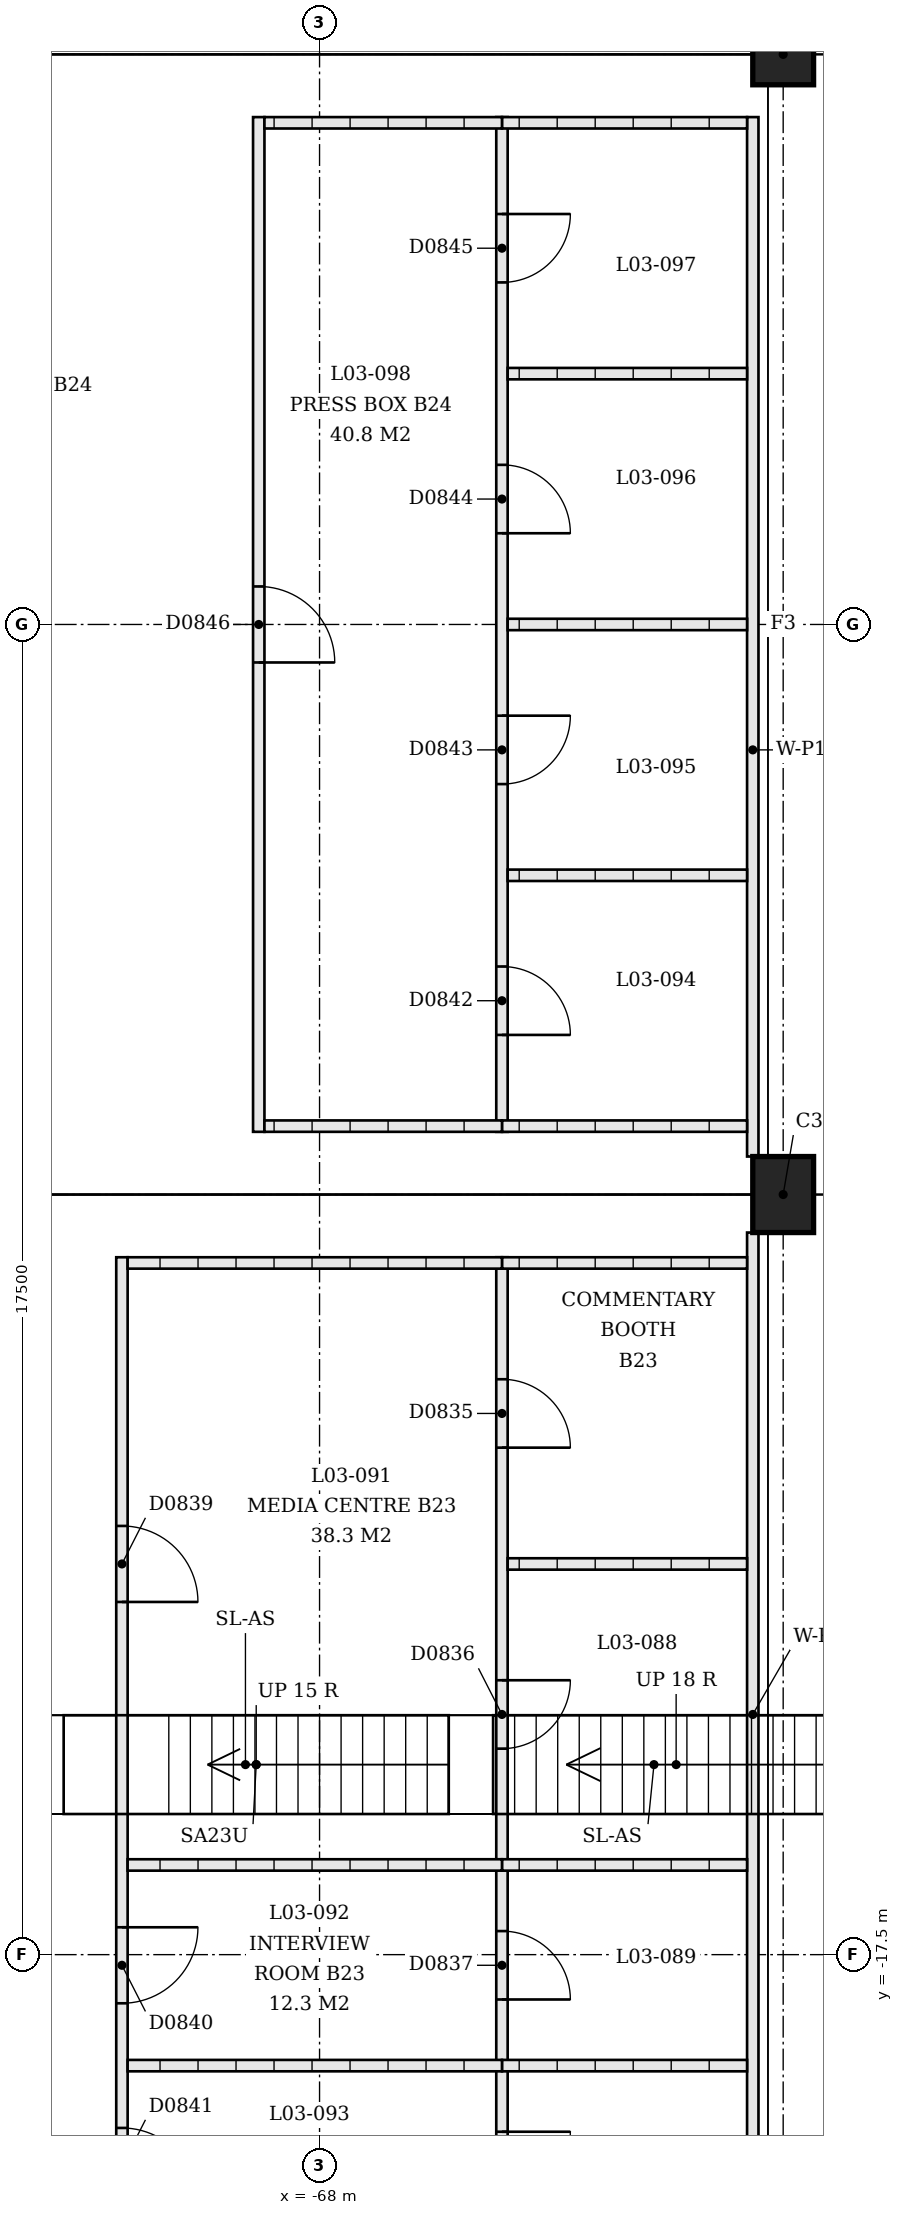
"""IFC4 building model, lengths in metres.
Left out: names, types, materials, properties, quantities, classifications, styles, units other than length and angle.
Written with IfcOpenShell. Run it as: python <this file> out.ifc"""

import sys

from ifc_helpers import new_model, si_unit, direction, frame, frame_2d, origin, origin_2d, place, context, subcontext, project, spatial, rectangle, extrude, element, fill, save


model = new_model("IFC4")
c1 = context("Model", 3, precision=1e-05, world=origin(), true_north=direction((0.0, 1.0)))
c2 = subcontext(c1, "Body", "Model", "MODEL_VIEW")
j1 = project(units=[si_unit("LENGTHUNIT", "METRE"), si_unit("PLANEANGLEUNIT", "RADIAN")], contexts=[c1])
p1 = place(None, origin())
s1 = spatial("IfcSite", under=j1, at=p1, CompositionType="ELEMENT")
p2 = place(p1, origin())
s2 = spatial("IfcBuilding", under=s1, at=p2, CompositionType="ELEMENT")
p3 = place(p2, frame((0.0, 0.0, 13.5)))
s3 = spatial("IfcBuildingStorey", under=s2, at=p3, CompositionType="ELEMENT", Elevation=13.5)
p4 = place(p3, frame((-61.9, -7.5, 0.0), z_axis=(0.0, 0.0, 1.0), x_axis=(0.0, -1.0, 0.0)))
e1 = element("IfcColumn", 1, at=p4, inside=s3, PredefinedType="COLUMN", context=c2, shape_type="SweptSolid", body=[
    extrude(rectangle(XDim=1.0, YDim=0.8, at=origin_2d()), origin(), (0.0, 0.0, 1.0), 2.033),
])
p5 = place(p3, frame((-61.9, 7.5, 0.0), z_axis=(0.0, 0.0, 1.0), x_axis=(0.0, -1.0, 0.0)))
e2 = element("IfcColumn", 2, at=p5, inside=s3, PredefinedType="COLUMN", context=c2, shape_type="SweptSolid", body=[
    extrude(rectangle(XDim=0.8, YDim=0.8, at=origin_2d()), origin(), (0.0, 0.0, 1.0), 2.033),
])
p6 = place(p3, frame((-62.3, -8.0, 0.0), z_axis=(0.0, 0.0, 1.0), x_axis=(0.0, -1.0, 0.0)))
e3 = element("IfcWall", 3, at=p6, inside=s3, PredefinedType="PARTITIONING", context=c2, shape_type="SweptSolid", body=[
    extrude(rectangle(XDim=13.675, YDim=0.15, at=frame_2d((6.837, 0.0))), origin(), (0.0, 0.0, 1.0), 3.0),
])
p7 = place(p3, frame((-65.6, -8.325, 0.0), z_axis=(0.0, 0.0, 1.0), x_axis=(0.0, -1.0, 0.0)))
e4 = element("IfcWall", 4, at=p7, inside=s3, PredefinedType="PARTITIONING", context=c2, shape_type="SweptSolid", body=[
    extrude(rectangle(XDim=13.35, YDim=0.15, at=frame_2d((6.675, 0.0))), origin(), (0.0, 0.0, 1.0), 3.0),
])
p8 = place(p7, frame((1.605, 0.0, 0.0)))
e5 = element("IfcOpeningElement", 5, at=p8, cuts=e4, PredefinedType="OPENING", context=c2, shape_type="SweptSolid", body=[
    extrude(rectangle(XDim=0.9, YDim=2.1, at=frame_2d((0.45, 1.05))), frame((0.0, 0.075, 0.0), z_axis=(0.0, -1.0, 0.0), x_axis=(1.0, 0.0, 0.0)), (0.0, 0.0, 1.0), 0.15),
])
p9 = place(p7, frame((5.565, 0.0, 0.0)))
e6 = element("IfcOpeningElement", 6, at=p9, cuts=e4, PredefinedType="OPENING", context=c2, shape_type="SweptSolid", body=[
    extrude(rectangle(XDim=0.9, YDim=2.1, at=frame_2d((0.45, 1.05))), frame((0.0, 0.075, 0.0), z_axis=(0.0, -1.0, 0.0), x_axis=(1.0, 0.0, 0.0)), (0.0, 0.0, 1.0), 0.15),
])
p10 = place(p7, frame((8.865, 0.0, 0.0)))
e7 = element("IfcOpeningElement", 7, at=p10, cuts=e4, PredefinedType="OPENING", context=c2, shape_type="SweptSolid", body=[
    extrude(rectangle(XDim=0.9, YDim=2.1, at=frame_2d((0.45, 1.05))), frame((0.0, 0.075, 0.0), z_axis=(0.0, -1.0, 0.0), x_axis=(1.0, 0.0, 0.0)), (0.0, 0.0, 1.0), 0.15),
])
p11 = place(p7, frame((11.505, 0.0, 0.0)))
e8 = element("IfcOpeningElement", 8, at=p11, cuts=e4, PredefinedType="OPENING", context=c2, shape_type="SweptSolid", body=[
    extrude(rectangle(XDim=0.9, YDim=2.1, at=frame_2d((0.45, 1.05))), frame((0.0, 0.075, 0.0), z_axis=(0.0, -1.0, 0.0), x_axis=(1.0, 0.0, 0.0)), (0.0, 0.0, 1.0), 0.15),
])
p12 = place(p3, frame((-62.375, -8.4, 0.0), z_axis=(0.0, 0.0, 1.0), x_axis=(-1.0, 0.0, 0.0)))
e9 = element("IfcWall", 9, at=p12, inside=s3, PredefinedType="PARTITIONING", context=c2, shape_type="SweptSolid", body=[
    extrude(rectangle(XDim=3.225, YDim=0.15, at=frame_2d((1.613, 0.0))), origin(), (0.0, 0.0, 1.0), 3.0),
])
p13 = place(p3, frame((-62.375, -12.36, 0.0), z_axis=(0.0, 0.0, 1.0), x_axis=(-1.0, 0.0, 0.0)))
e10 = element("IfcWall", 10, at=p13, inside=s3, PredefinedType="PARTITIONING", context=c2, shape_type="SweptSolid", body=[
    extrude(rectangle(XDim=3.15, YDim=0.15, at=frame_2d((1.575, 0.0))), origin(), (0.0, 0.0, 1.0), 3.0),
])
for number, where, z_axis, x_axis in (
    (11, (-62.375, -16.32, 0.0), (0.0, 0.0, 1.0), (-1.0, 0.0, 0.0)),
    (12, (-62.375, -18.96, 0.0), (0.0, 0.0, 1.0), (-1.0, 0.0, 0.0)),
):
    element("IfcWall", number, at=place(p3, frame(where, z_axis=z_axis, x_axis=x_axis)), inside=s3, PredefinedType="PARTITIONING", context=c2, shape_type="SweptSolid", body=[
        extrude(rectangle(XDim=3.225, YDim=0.15, at=frame_2d((1.613, 0.0))), origin(), (0.0, 0.0, 1.0), 3.0),
    ])
p14 = place(p3, frame((-70.6, -8.325, 0.0), z_axis=(0.0, 0.0, 1.0), x_axis=(0.0, -1.0, 0.0)))
e13 = element("IfcWall", 13, at=p14, inside=s3, PredefinedType="PARTITIONING", context=c2, shape_type="SweptSolid", body=[
    extrude(rectangle(XDim=13.35, YDim=0.15, at=frame_2d((6.675, 0.0))), origin(), (0.0, 0.0, 1.0), 3.0),
])
p15 = place(p14, frame((3.535, 0.0, 0.0)))
e14 = element("IfcOpeningElement", 14, at=p15, cuts=e13, PredefinedType="OPENING", context=c2, shape_type="SweptSolid", body=[
    extrude(rectangle(XDim=1.0, YDim=2.1, at=frame_2d((0.5, 1.05))), frame((0.0, 0.075, 0.0), z_axis=(0.0, -1.0, 0.0), x_axis=(1.0, 0.0, 0.0)), (0.0, 0.0, 1.0), 0.15),
])
p16 = place(p14, frame((8.815, 0.0, 0.0)))
e15 = element("IfcOpeningElement", 15, at=p16, cuts=e13, PredefinedType="OPENING", context=c2, shape_type="SweptSolid", body=[
    extrude(rectangle(XDim=1.0, YDim=2.1, at=frame_2d((0.5, 1.05))), frame((0.0, 0.075, 0.0), z_axis=(0.0, -1.0, 0.0), x_axis=(1.0, 0.0, 0.0)), (0.0, 0.0, 1.0), 0.15),
])
p17 = place(p14, frame((11.455, 0.0, 0.0)))
e16 = element("IfcOpeningElement", 16, at=p17, cuts=e13, PredefinedType="OPENING", context=c2, shape_type="SweptSolid", body=[
    extrude(rectangle(XDim=1.0, YDim=2.1, at=frame_2d((0.5, 1.05))), frame((0.0, 0.075, 0.0), z_axis=(0.0, -1.0, 0.0), x_axis=(1.0, 0.0, 0.0)), (0.0, 0.0, 1.0), 0.15),
])
for number, where, z_axis, x_axis in (
    (17, (-65.6, -8.4, 0.0), (0.0, 0.0, 1.0), (-1.0, 0.0, 0.0)),
    (18, (-65.6, -16.32, 0.0), (0.0, 0.0, 1.0), (-1.0, 0.0, 0.0)),
    (19, (-65.6, -18.96, 0.0), (0.0, 0.0, 1.0), (-1.0, 0.0, 0.0)),
):
    element("IfcWall", number, at=place(p3, frame(where, z_axis=z_axis, x_axis=x_axis)), inside=s3, PredefinedType="PARTITIONING", context=c2, shape_type="SweptSolid", body=[
        extrude(rectangle(XDim=4.925, YDim=0.15, at=frame_2d((2.462, 0.0))), origin(), (0.0, 0.0, 1.0), 3.0),
    ])
p18 = place(p3, frame((-62.3, -7.0, 0.0), z_axis=(0.0, 0.0, 1.0), x_axis=(0.0, 1.0, 0.0)))
e20 = element("IfcWall", 20, at=p18, inside=s3, PredefinedType="PARTITIONING", context=c2, shape_type="SweptSolid", body=[
    extrude(rectangle(XDim=13.675, YDim=0.15, at=frame_2d((6.837, 0.0))), origin(), (0.0, 0.0, 1.0), 3.0),
])
p19 = place(p3, frame((-65.6, -6.675, 0.0), z_axis=(0.0, 0.0, 1.0), x_axis=(0.0, 1.0, 0.0)))
e21 = element("IfcWall", 21, at=p19, inside=s3, PredefinedType="PARTITIONING", context=c2, shape_type="SweptSolid", body=[
    extrude(rectangle(XDim=13.35, YDim=0.15, at=frame_2d((6.675, 0.0))), origin(), (0.0, 0.0, 1.0), 3.0),
])
p20 = place(p19, frame((1.275, 0.0, 0.0)))
e22 = element("IfcOpeningElement", 22, at=p20, cuts=e21, PredefinedType="OPENING", context=c2, shape_type="SweptSolid", body=[
    extrude(rectangle(XDim=0.9, YDim=2.1, at=frame_2d((0.45, 1.05))), frame((0.0, 0.075, 0.0), z_axis=(0.0, -1.0, 0.0), x_axis=(1.0, 0.0, 0.0)), (0.0, 0.0, 1.0), 0.15),
])
p21 = place(p19, frame((4.575, 0.0, 0.0)))
e23 = element("IfcOpeningElement", 23, at=p21, cuts=e21, PredefinedType="OPENING", context=c2, shape_type="SweptSolid", body=[
    extrude(rectangle(XDim=0.9, YDim=2.1, at=frame_2d((0.45, 1.05))), frame((0.0, 0.075, 0.0), z_axis=(0.0, -1.0, 0.0), x_axis=(1.0, 0.0, 0.0)), (0.0, 0.0, 1.0), 0.15),
])
p22 = place(p19, frame((7.875, 0.0, 0.0)))
e24 = element("IfcOpeningElement", 24, at=p22, cuts=e21, PredefinedType="OPENING", context=c2, shape_type="SweptSolid", body=[
    extrude(rectangle(XDim=0.9, YDim=2.1, at=frame_2d((0.45, 1.05))), frame((0.0, 0.075, 0.0), z_axis=(0.0, -1.0, 0.0), x_axis=(1.0, 0.0, 0.0)), (0.0, 0.0, 1.0), 0.15),
])
p23 = place(p19, frame((11.175, 0.0, 0.0)))
e25 = element("IfcOpeningElement", 25, at=p23, cuts=e21, PredefinedType="OPENING", context=c2, shape_type="SweptSolid", body=[
    extrude(rectangle(XDim=0.9, YDim=2.1, at=frame_2d((0.45, 1.05))), frame((0.0, 0.075, 0.0), z_axis=(0.0, -1.0, 0.0), x_axis=(1.0, 0.0, 0.0)), (0.0, 0.0, 1.0), 0.15),
])
p24 = place(p3, frame((-62.375, -6.6, 0.0), z_axis=(0.0, 0.0, 1.0), x_axis=(-1.0, 0.0, 0.0)))
e26 = element("IfcWall", 26, at=p24, inside=s3, PredefinedType="PARTITIONING", context=c2, shape_type="SweptSolid", body=[
    extrude(rectangle(XDim=3.225, YDim=0.15, at=frame_2d((1.613, 0.0))), origin(), (0.0, 0.0, 1.0), 3.0),
])
for number, where, z_axis, x_axis in (
    (27, (-62.375, -3.3, 0.0), (0.0, 0.0, 1.0), (-1.0, 0.0, 0.0)),
    (28, (-62.375, 0.0, 0.0), (0.0, 0.0, 1.0), (-1.0, 0.0, 0.0)),
    (29, (-62.375, 3.3, 0.0), (0.0, 0.0, 1.0), (-1.0, 0.0, 0.0)),
):
    element("IfcWall", number, at=place(p3, frame(where, z_axis=z_axis, x_axis=x_axis)), inside=s3, PredefinedType="PARTITIONING", context=c2, shape_type="SweptSolid", body=[
        extrude(rectangle(XDim=3.15, YDim=0.15, at=frame_2d((1.575, 0.0))), origin(), (0.0, 0.0, 1.0), 3.0),
    ])
p25 = place(p3, frame((-62.375, 6.6, 0.0), z_axis=(0.0, 0.0, 1.0), x_axis=(-1.0, 0.0, 0.0)))
e30 = element("IfcWall", 30, at=p25, inside=s3, PredefinedType="PARTITIONING", context=c2, shape_type="SweptSolid", body=[
    extrude(rectangle(XDim=3.225, YDim=0.15, at=frame_2d((1.613, 0.0))), origin(), (0.0, 0.0, 1.0), 3.0),
])
p26 = place(p3, frame((-68.8, -6.675, 0.0), z_axis=(0.0, 0.0, 1.0), x_axis=(0.0, 1.0, 0.0)))
e31 = element("IfcWall", 31, at=p26, inside=s3, PredefinedType="PARTITIONING", context=c2, shape_type="SweptSolid", body=[
    extrude(rectangle(XDim=13.35, YDim=0.15, at=frame_2d((6.675, 0.0))), origin(), (0.0, 0.0, 1.0), 3.0),
])
p27 = place(p26, frame((6.175, 0.0, 0.0)))
e32 = element("IfcOpeningElement", 32, at=p27, cuts=e31, PredefinedType="OPENING", context=c2, shape_type="SweptSolid", body=[
    extrude(rectangle(XDim=1.0, YDim=2.1, at=frame_2d((0.5, 1.05))), frame((0.0, 0.075, 0.0), z_axis=(0.0, -1.0, 0.0), x_axis=(1.0, 0.0, 0.0)), (0.0, 0.0, 1.0), 0.15),
])
for number, where, z_axis, x_axis in (
    (33, (-65.6, -6.6, 0.0), (0.0, 0.0, 1.0), (-1.0, 0.0, 0.0)),
    (34, (-65.6, 6.6, 0.0), (0.0, 0.0, 1.0), (-1.0, 0.0, 0.0)),
):
    element("IfcWall", number, at=place(p3, frame(where, z_axis=z_axis, x_axis=x_axis)), inside=s3, PredefinedType="PARTITIONING", context=c2, shape_type="SweptSolid", body=[
        extrude(rectangle(XDim=3.125, YDim=0.15, at=frame_2d((1.562, 0.0))), origin(), (0.0, 0.0, 1.0), 3.0),
    ])
p28 = place(p8, origin())
e35 = element("IfcDoor", 35, at=p28, inside=s3, OperationType="SINGLE_SWING_LEFT", PredefinedType="DOOR", context=c2, shape_type="SweptSolid", body=[
    extrude(rectangle(XDim=0.9, YDim=2.1, at=frame_2d((0.45, 1.05))), frame((0.0, 0.025, 0.0), z_axis=(0.0, -1.0, 0.0), x_axis=(1.0, 0.0, 0.0)), (0.0, 0.0, 1.0), 0.05),
])
fill(e5, e35)
p29 = place(p9, origin())
e36 = element("IfcDoor", 36, at=p29, inside=s3, OperationType="SINGLE_SWING_RIGHT", PredefinedType="DOOR", context=c2, shape_type="SweptSolid", body=[
    extrude(rectangle(XDim=0.9, YDim=2.1, at=frame_2d((0.45, 1.05))), frame((0.0, 0.025, 0.0), z_axis=(0.0, -1.0, 0.0), x_axis=(1.0, 0.0, 0.0)), (0.0, 0.0, 1.0), 0.05),
])
fill(e6, e36)
p30 = place(p10, origin())
e37 = element("IfcDoor", 37, at=p30, inside=s3, OperationType="SINGLE_SWING_LEFT", PredefinedType="DOOR", context=c2, shape_type="SweptSolid", body=[
    extrude(rectangle(XDim=0.9, YDim=2.1, at=frame_2d((0.45, 1.05))), frame((0.0, 0.025, 0.0), z_axis=(0.0, -1.0, 0.0), x_axis=(1.0, 0.0, 0.0)), (0.0, 0.0, 1.0), 0.05),
])
fill(e7, e37)
p31 = place(p11, origin())
e38 = element("IfcDoor", 38, at=p31, inside=s3, OperationType="SINGLE_SWING_RIGHT", PredefinedType="DOOR", context=c2, shape_type="SweptSolid", body=[
    extrude(rectangle(XDim=0.9, YDim=2.1, at=frame_2d((0.45, 1.05))), frame((0.0, 0.025, 0.0), z_axis=(0.0, -1.0, 0.0), x_axis=(1.0, 0.0, 0.0)), (0.0, 0.0, 1.0), 0.05),
])
fill(e8, e38)
p32 = place(p15, origin())
e39 = element("IfcDoor", 39, at=p32, inside=s3, OperationType="SINGLE_SWING_LEFT", PredefinedType="DOOR", context=c2, shape_type="SweptSolid", body=[
    extrude(rectangle(XDim=1.0, YDim=2.1, at=frame_2d((0.5, 1.05))), frame((0.0, 0.025, 0.0), z_axis=(0.0, -1.0, 0.0), x_axis=(1.0, 0.0, 0.0)), (0.0, 0.0, 1.0), 0.05),
])
fill(e14, e39)
p33 = place(p16, origin())
e40 = element("IfcDoor", 40, at=p33, inside=s3, OperationType="SINGLE_SWING_RIGHT", PredefinedType="DOOR", context=c2, shape_type="SweptSolid", body=[
    extrude(rectangle(XDim=1.0, YDim=2.1, at=frame_2d((0.5, 1.05))), frame((0.0, 0.025, 0.0), z_axis=(0.0, -1.0, 0.0), x_axis=(1.0, 0.0, 0.0)), (0.0, 0.0, 1.0), 0.05),
])
fill(e15, e40)
p34 = place(p17, origin())
e41 = element("IfcDoor", 41, at=p34, inside=s3, OperationType="SINGLE_SWING_LEFT", PredefinedType="DOOR", context=c2, shape_type="SweptSolid", body=[
    extrude(rectangle(XDim=1.0, YDim=2.1, at=frame_2d((0.5, 1.05))), frame((0.0, 0.025, 0.0), z_axis=(0.0, -1.0, 0.0), x_axis=(1.0, 0.0, 0.0)), (0.0, 0.0, 1.0), 0.05),
])
fill(e16, e41)
p35 = place(p20, origin())
e42 = element("IfcDoor", 42, at=p35, inside=s3, OperationType="SINGLE_SWING_LEFT", PredefinedType="DOOR", context=c2, shape_type="SweptSolid", body=[
    extrude(rectangle(XDim=0.9, YDim=2.1, at=frame_2d((0.45, 1.05))), frame((0.0, 0.025, 0.0), z_axis=(0.0, -1.0, 0.0), x_axis=(1.0, 0.0, 0.0)), (0.0, 0.0, 1.0), 0.05),
])
fill(e22, e42)
p36 = place(p21, origin())
e43 = element("IfcDoor", 43, at=p36, inside=s3, OperationType="SINGLE_SWING_RIGHT", PredefinedType="DOOR", context=c2, shape_type="SweptSolid", body=[
    extrude(rectangle(XDim=0.9, YDim=2.1, at=frame_2d((0.45, 1.05))), frame((0.0, 0.025, 0.0), z_axis=(0.0, -1.0, 0.0), x_axis=(1.0, 0.0, 0.0)), (0.0, 0.0, 1.0), 0.05),
])
fill(e23, e43)
p37 = place(p22, origin())
e44 = element("IfcDoor", 44, at=p37, inside=s3, OperationType="SINGLE_SWING_LEFT", PredefinedType="DOOR", context=c2, shape_type="SweptSolid", body=[
    extrude(rectangle(XDim=0.9, YDim=2.1, at=frame_2d((0.45, 1.05))), frame((0.0, 0.025, 0.0), z_axis=(0.0, -1.0, 0.0), x_axis=(1.0, 0.0, 0.0)), (0.0, 0.0, 1.0), 0.05),
])
fill(e24, e44)
p38 = place(p23, origin())
e45 = element("IfcDoor", 45, at=p38, inside=s3, OperationType="SINGLE_SWING_RIGHT", PredefinedType="DOOR", context=c2, shape_type="SweptSolid", body=[
    extrude(rectangle(XDim=0.9, YDim=2.1, at=frame_2d((0.45, 1.05))), frame((0.0, 0.025, 0.0), z_axis=(0.0, -1.0, 0.0), x_axis=(1.0, 0.0, 0.0)), (0.0, 0.0, 1.0), 0.05),
])
fill(e25, e45)
p39 = place(p27, origin())
e46 = element("IfcDoor", 46, at=p39, inside=s3, OperationType="SINGLE_SWING_LEFT", PredefinedType="DOOR", context=c2, shape_type="SweptSolid", body=[
    extrude(rectangle(XDim=1.0, YDim=2.1, at=frame_2d((0.5, 1.05))), frame((0.0, 0.025, 0.0), z_axis=(0.0, -1.0, 0.0), x_axis=(1.0, 0.0, 0.0)), (0.0, 0.0, 1.0), 0.05),
])
fill(e32, e46)
save(model, sys.argv[1])
